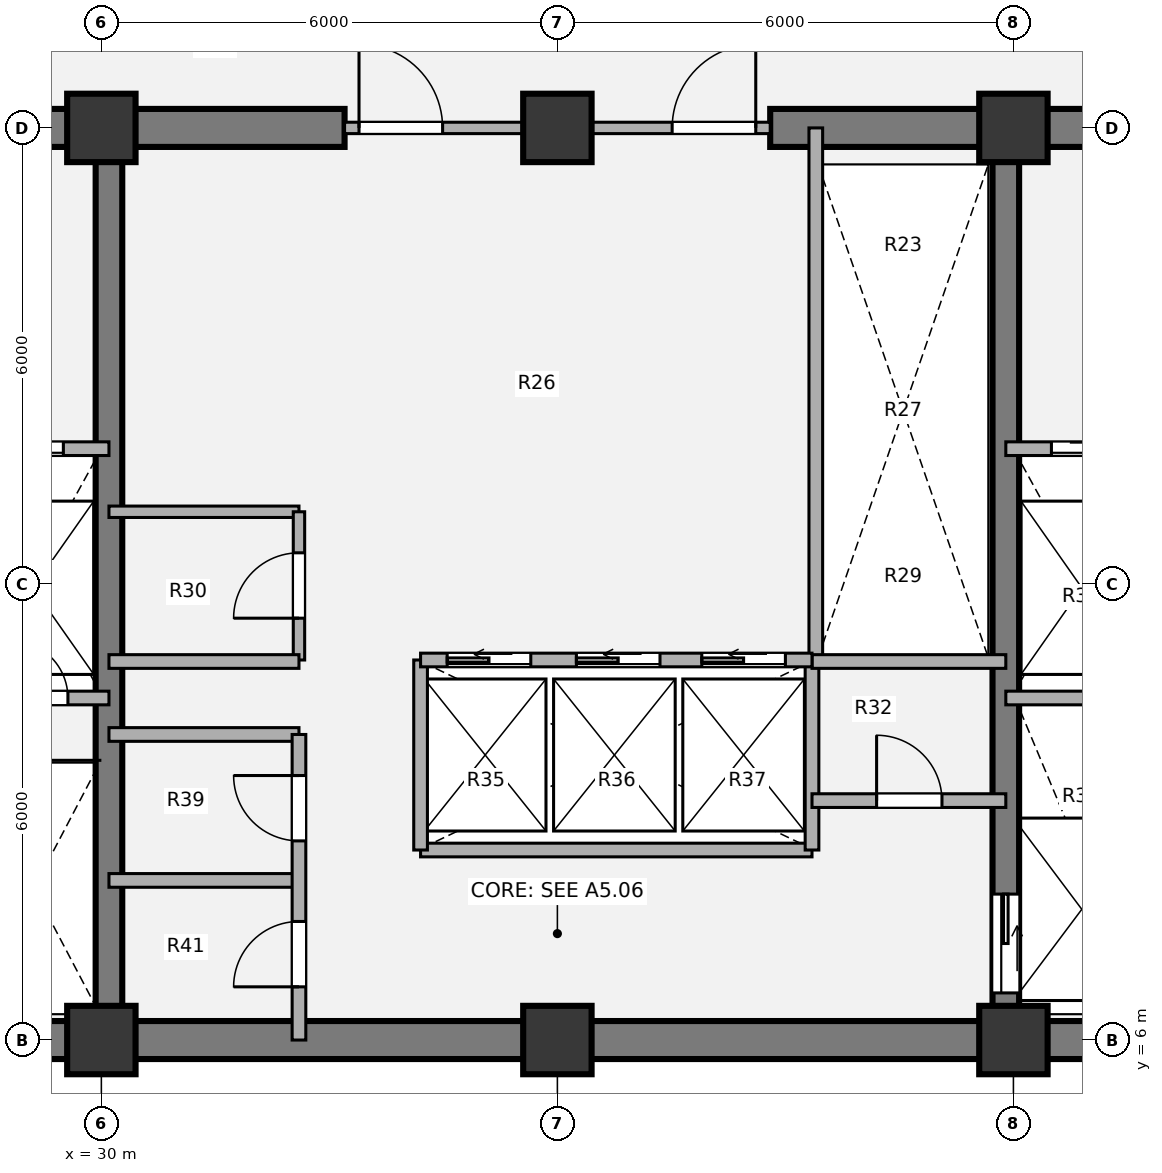
"""IFC4 building model, lengths in metres.
Left out: names, types, materials, properties, quantities, classifications, styles, units other than length and angle.
Written with IfcOpenShell. Run it as: python <this file> out.ifc"""

import sys

from ifc_helpers import new_model, si_unit, direction, frame, frame_2d, origin, origin_2d, place, context, subcontext, project, spatial, rectangle, extrude, source, transform, mapped, element, fill, save


model = new_model("IFC4")
c1 = context("Model", 3, precision=1e-05, world=origin(), true_north=direction((0.0, 1.0)))
c2 = subcontext(c1, "Body", "Model", "MODEL_VIEW")
j1 = project(units=[si_unit("LENGTHUNIT", "METRE"), si_unit("PLANEANGLEUNIT", "RADIAN")], contexts=[c1])
p1 = place(None, origin())
s1 = spatial("IfcSite", under=j1, at=p1, CompositionType="ELEMENT")
p2 = place(p1, origin())
s2 = spatial("IfcBuilding", under=s1, at=p2, CompositionType="ELEMENT")
p3 = place(p2, frame((0.0, 0.0, 97.38)))
s3 = spatial("IfcBuildingStorey", under=s2, at=p3, CompositionType="ELEMENT", Elevation=97.38)
m1 = source(origin(), c2, "Body", "SweptSolid", [
    extrude(rectangle(XDim=0.9, YDim=0.9, at=origin_2d()), origin(), (0.0, 0.0, 1.0), 3.78),
])
for number, where, z_axis, x_axis in (
    (1, (30.0, 6.0, 0.0), (0.0, 0.0, 1.0), (1.0, 0.0, 0.0)),
    (2, (36.0, 6.0, 0.0), (0.0, 0.0, 1.0), (1.0, 0.0, 0.0)),
    (3, (42.0, 6.0, 0.0), (0.0, 0.0, 1.0), (1.0, 0.0, 0.0)),
    (4, (30.0, 18.0, 0.0), (0.0, 0.0, 1.0), (1.0, 0.0, 0.0)),
    (5, (36.0, 18.0, 0.0), (0.0, 0.0, 1.0), (1.0, 0.0, 0.0)),
    (6, (42.0, 18.0, 0.0), (0.0, 0.0, 1.0), (1.0, 0.0, 0.0)),
):
    element("IfcColumn", number, at=place(p3, frame(where, z_axis=z_axis, x_axis=x_axis)), inside=s3, PredefinedType="COLUMN", context=c2, shape_type="MappedRepresentation", body=[
        mapped(m1, transform((0.0, 0.0, 0.0), x_axis=(1.0, 0.0, 0.0), y_axis=(0.0, 1.0, 0.0), z_axis=(0.0, 0.0, 1.0), scale=1.0)),
    ])
p4 = place(p3, frame((48.25, 6.0, 0.0), z_axis=(0.0, 0.0, 1.0), x_axis=(-1.0, 0.0, 0.0)))
e7 = element("IfcWall", 7, at=p4, inside=s3, PredefinedType="SHEAR", context=c2, shape_type="SweptSolid", body=[
    extrude(rectangle(XDim=24.5, YDim=0.5, at=frame_2d((12.25, 0.0))), origin(), (0.0, 0.0, 1.0), 3.78),
])
p5 = place(p3, frame((23.75, 18.0, 0.0), z_axis=(0.0, 0.0, 1.0), x_axis=(1.0, 0.0, 0.0)))
e8 = element("IfcWall", 8, at=p5, inside=s3, PredefinedType="SHEAR", context=c2, shape_type="SweptSolid", body=[
    extrude(rectangle(XDim=9.45, YDim=0.5, at=frame_2d((4.725, 0.0))), origin(), (0.0, 0.0, 1.0), 3.78),
])
p6 = place(p5, frame((2.95, 0.0, 0.0)))
e9 = element("IfcOpeningElement", 9, at=p6, cuts=e8, PredefinedType="OPENING", context=c2, shape_type="SweptSolid", body=[
    extrude(rectangle(XDim=1.1, YDim=2.1, at=origin_2d()), frame((0.55, 0.26, 1.05), z_axis=(0.0, -1.0, 0.0), x_axis=(1.0, 0.0, 0.0)), (0.0, 0.0, 1.0), 0.52),
])
p7 = place(p3, frame((38.8, 18.0, 0.0), z_axis=(0.0, 0.0, 1.0), x_axis=(1.0, 0.0, 0.0)))
e10 = element("IfcWall", 10, at=p7, inside=s3, PredefinedType="SHEAR", context=c2, shape_type="SweptSolid", body=[
    extrude(rectangle(XDim=9.45, YDim=0.5, at=frame_2d((4.725, 0.0))), origin(), (0.0, 0.0, 1.0), 3.78),
])
p8 = place(p7, frame((5.45, 0.0, 0.0)))
e11 = element("IfcOpeningElement", 11, at=p8, cuts=e10, PredefinedType="OPENING", context=c2, shape_type="SweptSolid", body=[
    extrude(rectangle(XDim=1.1, YDim=2.1, at=origin_2d()), frame((0.55, 0.26, 1.05), z_axis=(0.0, -1.0, 0.0), x_axis=(1.0, 0.0, 0.0)), (0.0, 0.0, 1.0), 0.52),
])
p9 = place(p3, frame((30.1, 6.0, 0.0), z_axis=(0.0, 0.0, 1.0), x_axis=(0.0, 1.0, 0.0)))
e12 = element("IfcWall", 12, at=p9, inside=s3, PredefinedType="SHEAR", context=c2, shape_type="SweptSolid", body=[
    extrude(rectangle(XDim=12.0, YDim=0.35, at=frame_2d((6.0, 0.0))), origin(), (0.0, 0.0, 1.0), 3.78),
])
p10 = place(p3, frame((41.9, 18.0, 0.0), z_axis=(0.0, 0.0, 1.0), x_axis=(0.0, -1.0, 0.0)))
e13 = element("IfcWall", 13, at=p10, inside=s3, PredefinedType="SHEAR", context=c2, shape_type="SweptSolid", body=[
    extrude(rectangle(XDim=12.0, YDim=0.35, at=frame_2d((6.0, 0.0))), origin(), (0.0, 0.0, 1.0), 3.78),
])
p11 = place(p10, frame((10.08, 0.0, 0.0)))
e14 = element("IfcOpeningElement", 14, at=p11, cuts=e13, PredefinedType="OPENING", context=c2, shape_type="SweptSolid", body=[
    extrude(rectangle(XDim=1.3, YDim=2.1, at=origin_2d()), frame((0.65, 0.185, 1.05), z_axis=(0.0, -1.0, 0.0), x_axis=(1.0, 0.0, 0.0)), (0.0, 0.0, 1.0), 0.37),
])
p12 = place(p3, frame((30.1, 12.95, 0.0), z_axis=(0.0, 0.0, 1.0), x_axis=(1.0, 0.0, 0.0)))
e15 = element("IfcWall", 15, at=p12, inside=s3, PredefinedType="PARTITIONING", context=c2, shape_type="SweptSolid", body=[
    extrude(rectangle(XDim=2.5, YDim=0.15, at=frame_2d((1.25, 0.0))), origin(), (0.0, 0.0, 1.0), 3.5),
])
p13 = place(p3, frame((32.6, 11.0, 0.0), z_axis=(0.0, 0.0, 1.0), x_axis=(0.0, 1.0, 0.0)))
e16 = element("IfcWall", 16, at=p13, inside=s3, PredefinedType="PARTITIONING", context=c2, shape_type="SweptSolid", body=[
    extrude(rectangle(XDim=1.95, YDim=0.15, at=frame_2d((0.975, 0.0))), origin(), (0.0, 0.0, 1.0), 3.5),
])
p14 = place(p13, frame((0.55, 0.0, 0.0)))
e17 = element("IfcOpeningElement", 17, at=p14, cuts=e16, PredefinedType="OPENING", context=c2, shape_type="SweptSolid", body=[
    extrude(rectangle(XDim=0.86, YDim=2.1, at=origin_2d()), frame((0.43, 0.085, 1.05), z_axis=(0.0, -1.0, 0.0), x_axis=(1.0, 0.0, 0.0)), (0.0, 0.0, 1.0), 0.17),
])
p15 = place(p3, frame((34.2, 8.5, 0.0), z_axis=(0.0, 0.0, 1.0), x_axis=(1.0, 0.0, 0.0)))
e18 = element("IfcWall", 18, at=p15, inside=s3, PredefinedType="PARTITIONING", context=c2, shape_type="SweptSolid", body=[
    extrude(rectangle(XDim=5.15, YDim=0.18, at=frame_2d((2.575, 0.0))), origin(), (0.0, 0.0, 1.0), 3.5),
])
for number, where, z_axis, x_axis in (
    (19, (34.2, 8.5, 0.0), (0.0, 0.0, 1.0), (0.0, 1.0, 0.0)),
    (20, (39.35, 8.5, 0.0), (0.0, 0.0, 1.0), (0.0, 1.0, 0.0)),
):
    element("IfcWall", number, at=place(p3, frame(where, z_axis=z_axis, x_axis=x_axis)), inside=s3, PredefinedType="PARTITIONING", context=c2, shape_type="SweptSolid", body=[
        extrude(rectangle(XDim=2.5, YDim=0.18, at=frame_2d((1.25, 0.0))), origin(), (0.0, 0.0, 1.0), 3.5),
    ])
p16 = place(p3, frame((39.4, 11.0, 0.0), z_axis=(0.0, 0.0, 1.0), x_axis=(0.0, 1.0, 0.0)))
e21 = element("IfcWall", 21, at=p16, inside=s3, PredefinedType="PARTITIONING", context=c2, shape_type="SweptSolid", body=[
    extrude(rectangle(XDim=7.0, YDim=0.18, at=frame_2d((3.5, 0.0))), origin(), (0.0, 0.0, 1.0), 3.5),
])
p17 = place(p3, frame((30.1, 10.98, 0.0), z_axis=(0.0, 0.0, 1.0), x_axis=(1.0, 0.0, 0.0)))
e22 = element("IfcWall", 22, at=p17, inside=s3, PredefinedType="PARTITIONING", context=c2, shape_type="SweptSolid", body=[
    extrude(rectangle(XDim=2.5, YDim=0.18, at=frame_2d((1.25, 0.0))), origin(), (0.0, 0.0, 1.0), 3.5),
])
p18 = place(p3, frame((39.35, 10.98, 0.0), z_axis=(0.0, 0.0, 1.0), x_axis=(1.0, 0.0, 0.0)))
e23 = element("IfcWall", 23, at=p18, inside=s3, PredefinedType="PARTITIONING", context=c2, shape_type="SweptSolid", body=[
    extrude(rectangle(XDim=2.55, YDim=0.18, at=frame_2d((1.275, 0.0))), origin(), (0.0, 0.0, 1.0), 3.5),
])
for number, where, z_axis, x_axis in (
    (24, (30.1, 8.1, 0.0), (0.0, 0.0, 1.0), (1.0, 0.0, 0.0)),
    (25, (30.1, 10.02, 0.0), (0.0, 0.0, 1.0), (1.0, 0.0, 0.0)),
):
    element("IfcWall", number, at=place(p3, frame(where, z_axis=z_axis, x_axis=x_axis)), inside=s3, PredefinedType="PARTITIONING", context=c2, shape_type="SweptSolid", body=[
        extrude(rectangle(XDim=2.5, YDim=0.18, at=frame_2d((1.25, 0.0))), origin(), (0.0, 0.0, 1.0), 3.5),
    ])
p19 = place(p3, frame((32.6, 6.0, 0.0), z_axis=(0.0, 0.0, 1.0), x_axis=(0.0, 1.0, 0.0)))
e26 = element("IfcWall", 26, at=p19, inside=s3, PredefinedType="PARTITIONING", context=c2, shape_type="SweptSolid", body=[
    extrude(rectangle(XDim=4.02, YDim=0.18, at=frame_2d((2.01, 0.0))), origin(), (0.0, 0.0, 1.0), 3.5),
])
p20 = place(p19, frame((0.7, 0.0, 0.0)))
e27 = element("IfcOpeningElement", 27, at=p20, cuts=e26, PredefinedType="OPENING", context=c2, shape_type="SweptSolid", body=[
    extrude(rectangle(XDim=0.86, YDim=2.1, at=origin_2d()), frame((0.43, 0.1, 1.05), z_axis=(0.0, -1.0, 0.0), x_axis=(1.0, 0.0, 0.0)), (0.0, 0.0, 1.0), 0.2),
])
p21 = place(p19, frame((2.62, 0.0, 0.0)))
e28 = element("IfcOpeningElement", 28, at=p21, cuts=e26, PredefinedType="OPENING", context=c2, shape_type="SweptSolid", body=[
    extrude(rectangle(XDim=0.86, YDim=2.1, at=origin_2d()), frame((0.43, 0.1, 1.05), z_axis=(0.0, -1.0, 0.0), x_axis=(1.0, 0.0, 0.0)), (0.0, 0.0, 1.0), 0.2),
])
p22 = place(p3, frame((39.35, 9.15, 0.0), z_axis=(0.0, 0.0, 1.0), x_axis=(1.0, 0.0, 0.0)))
e29 = element("IfcWall", 29, at=p22, inside=s3, PredefinedType="PARTITIONING", context=c2, shape_type="SweptSolid", body=[
    extrude(rectangle(XDim=2.55, YDim=0.18, at=frame_2d((1.275, 0.0))), origin(), (0.0, 0.0, 1.0), 3.5),
])
p23 = place(p22, frame((0.85, 0.0, 0.0)))
e30 = element("IfcOpeningElement", 30, at=p23, cuts=e29, PredefinedType="OPENING", context=c2, shape_type="SweptSolid", body=[
    extrude(rectangle(XDim=0.86, YDim=2.1, at=origin_2d()), frame((0.43, 0.1, 1.05), z_axis=(0.0, -1.0, 0.0), x_axis=(1.0, 0.0, 0.0)), (0.0, 0.0, 1.0), 0.2),
])
p24 = place(p3, frame((33.2, 18.0, 0.0), z_axis=(0.0, 0.0, 1.0), x_axis=(1.0, 0.0, 0.0)))
e31 = element("IfcWall", 31, at=p24, inside=s3, PredefinedType="PARTITIONING", context=c2, shape_type="SweptSolid", body=[
    extrude(rectangle(XDim=5.6, YDim=0.15, at=frame_2d((2.8, 0.0))), origin(), (0.0, 0.0, 1.0), 2.315),
])
p25 = place(p24, frame((0.19, 0.0, 0.0)))
e32 = element("IfcOpeningElement", 32, at=p25, cuts=e31, PredefinedType="OPENING", context=c2, shape_type="SweptSolid", body=[
    extrude(rectangle(XDim=1.1, YDim=2.1, at=origin_2d()), frame((0.55, 0.085, 1.05), z_axis=(0.0, -1.0, 0.0), x_axis=(1.0, 0.0, 0.0)), (0.0, 0.0, 1.0), 0.17),
])
p26 = place(p24, frame((4.31, 0.0, 0.0)))
e33 = element("IfcOpeningElement", 33, at=p26, cuts=e31, PredefinedType="OPENING", context=c2, shape_type="SweptSolid", body=[
    extrude(rectangle(XDim=1.1, YDim=2.1, at=origin_2d()), frame((0.55, 0.085, 1.05), z_axis=(0.0, -1.0, 0.0), x_axis=(1.0, 0.0, 0.0)), (0.0, 0.0, 1.0), 0.17),
])
p27 = place(p3, frame((24.0, 13.78, 0.0), z_axis=(0.0, 0.0, 1.0), x_axis=(1.0, 0.0, 0.0)))
e34 = element("IfcWall", 34, at=p27, inside=s3, PredefinedType="PARTITIONING", context=c2, shape_type="SweptSolid", body=[
    extrude(rectangle(XDim=6.1, YDim=0.18, at=frame_2d((3.05, 0.0))), origin(), (0.0, 0.0, 1.0), 3.5),
])
p28 = place(p27, frame((1.15, 0.0, 0.0)))
e35 = element("IfcOpeningElement", 35, at=p28, cuts=e34, PredefinedType="OPENING", context=c2, shape_type="SweptSolid", body=[
    extrude(rectangle(XDim=1.1, YDim=2.1, at=origin_2d()), frame((0.55, 0.1, 1.05), z_axis=(0.0, -1.0, 0.0), x_axis=(1.0, 0.0, 0.0)), (0.0, 0.0, 1.0), 0.2),
])
p29 = place(p27, frame((4.4, 0.0, 0.0)))
e36 = element("IfcOpeningElement", 36, at=p29, cuts=e34, PredefinedType="OPENING", context=c2, shape_type="SweptSolid", body=[
    extrude(rectangle(XDim=1.1, YDim=2.1, at=origin_2d()), frame((0.55, 0.1, 1.05), z_axis=(0.0, -1.0, 0.0), x_axis=(1.0, 0.0, 0.0)), (0.0, 0.0, 1.0), 0.2),
])
p30 = place(p3, frame((28.15, 10.5, 0.0), z_axis=(0.0, 0.0, 1.0), x_axis=(1.0, 0.0, 0.0)))
e37 = element("IfcWall", 37, at=p30, inside=s3, PredefinedType="PARTITIONING", context=c2, shape_type="SweptSolid", body=[
    extrude(rectangle(XDim=1.95, YDim=0.18, at=frame_2d((0.975, 0.0))), origin(), (0.0, 0.0, 1.0), 3.5),
])
p31 = place(p30, frame((0.65, 0.0, 0.0)))
e38 = element("IfcOpeningElement", 38, at=p31, cuts=e37, PredefinedType="OPENING", context=c2, shape_type="SweptSolid", body=[
    extrude(rectangle(XDim=0.76, YDim=2.05, at=origin_2d()), frame((0.38, 0.1, 1.025), z_axis=(0.0, -1.0, 0.0), x_axis=(1.0, 0.0, 0.0)), (0.0, 0.0, 1.0), 0.2),
])
p32 = place(p3, frame((41.9, 13.78, 0.0), z_axis=(0.0, 0.0, 1.0), x_axis=(1.0, 0.0, 0.0)))
e39 = element("IfcWall", 39, at=p32, inside=s3, PredefinedType="PARTITIONING", context=c2, shape_type="SweptSolid", body=[
    extrude(rectangle(XDim=6.1, YDim=0.18, at=frame_2d((3.05, 0.0))), origin(), (0.0, 0.0, 1.0), 3.5),
])
p33 = place(p32, frame((0.6, 0.0, 0.0)))
e40 = element("IfcOpeningElement", 40, at=p33, cuts=e39, PredefinedType="OPENING", context=c2, shape_type="SweptSolid", body=[
    extrude(rectangle(XDim=1.1, YDim=2.1, at=origin_2d()), frame((0.55, 0.1, 1.05), z_axis=(0.0, -1.0, 0.0), x_axis=(1.0, 0.0, 0.0)), (0.0, 0.0, 1.0), 0.2),
])
p34 = place(p32, frame((3.8, 0.0, 0.0)))
e41 = element("IfcOpeningElement", 41, at=p34, cuts=e39, PredefinedType="OPENING", context=c2, shape_type="SweptSolid", body=[
    extrude(rectangle(XDim=1.1, YDim=2.1, at=origin_2d()), frame((0.55, 0.1, 1.05), z_axis=(0.0, -1.0, 0.0), x_axis=(1.0, 0.0, 0.0)), (0.0, 0.0, 1.0), 0.2),
])
p35 = place(p3, frame((41.9, 10.5, 0.0), z_axis=(0.0, 0.0, 1.0), x_axis=(1.0, 0.0, 0.0)))
e42 = element("IfcWall", 42, at=p35, inside=s3, PredefinedType="PARTITIONING", context=c2, shape_type="SweptSolid", body=[
    extrude(rectangle(XDim=1.95, YDim=0.18, at=frame_2d((0.975, 0.0))), origin(), (0.0, 0.0, 1.0), 3.5),
])
p36 = place(p3, frame((34.2, 11.0, 0.0), z_axis=(0.0, 0.0, 1.0), x_axis=(1.0, 0.0, 0.0)))
e43 = element("IfcWall", 43, at=p36, inside=s3, PredefinedType="PARTITIONING", context=c2, shape_type="SweptSolid", body=[
    extrude(rectangle(XDim=5.15, YDim=0.18, at=frame_2d((2.575, 0.0))), origin(), (0.0, 0.0, 1.0), 3.5),
])
p37 = place(p36, frame((0.35, 0.0, 0.0)))
e44 = element("IfcOpeningElement", 44, at=p37, cuts=e43, PredefinedType="OPENING", context=c2, shape_type="SweptSolid", body=[
    extrude(rectangle(XDim=1.1, YDim=2.1, at=origin_2d()), frame((0.55, 0.1, 1.05), z_axis=(0.0, -1.0, 0.0), x_axis=(1.0, 0.0, 0.0)), (0.0, 0.0, 1.0), 0.2),
])
p38 = place(p36, frame((2.05, 0.0, 0.0)))
e45 = element("IfcOpeningElement", 45, at=p38, cuts=e43, PredefinedType="OPENING", context=c2, shape_type="SweptSolid", body=[
    extrude(rectangle(XDim=1.1, YDim=2.1, at=origin_2d()), frame((0.55, 0.1, 1.05), z_axis=(0.0, -1.0, 0.0), x_axis=(1.0, 0.0, 0.0)), (0.0, 0.0, 1.0), 0.2),
])
p39 = place(p36, frame((3.7, 0.0, 0.0)))
e46 = element("IfcOpeningElement", 46, at=p39, cuts=e43, PredefinedType="OPENING", context=c2, shape_type="SweptSolid", body=[
    extrude(rectangle(XDim=1.1, YDim=2.1, at=origin_2d()), frame((0.55, 0.1, 1.05), z_axis=(0.0, -1.0, 0.0), x_axis=(1.0, 0.0, 0.0)), (0.0, 0.0, 1.0), 0.2),
])
m2 = source(origin(), c2, "Body", "SweptSolid", [
    extrude(rectangle(XDim=0.86, YDim=2.1, at=origin_2d()), frame((0.43, 0.025, 1.05), z_axis=(0.0, -1.0, 0.0), x_axis=(1.0, 0.0, 0.0)), (0.0, 0.0, 1.0), 0.05),
])
p40 = place(p14, origin())
e47 = element("IfcDoor", 47, at=p40, inside=s3, OperationType="SINGLE_SWING_LEFT", PredefinedType="DOOR", context=c2, shape_type="MappedRepresentation", body=[
    mapped(m2, transform((0.0, 0.0, 0.0), x_axis=(1.0, 0.0, 0.0), y_axis=(0.0, 1.0, 0.0), z_axis=(0.0, 0.0, 1.0), scale=1.0)),
])
fill(e17, e47)
p41 = place(p20, origin())
e48 = element("IfcDoor", 48, at=p41, inside=s3, OperationType="SINGLE_SWING_LEFT", PredefinedType="DOOR", context=c2, shape_type="MappedRepresentation", body=[
    mapped(m2, transform((0.0, 0.0, 0.0), x_axis=(1.0, 0.0, 0.0), y_axis=(0.0, 1.0, 0.0), z_axis=(0.0, 0.0, 1.0), scale=1.0)),
])
fill(e27, e48)
p42 = place(p21, origin())
e49 = element("IfcDoor", 49, at=p42, inside=s3, OperationType="SINGLE_SWING_RIGHT", PredefinedType="DOOR", context=c2, shape_type="MappedRepresentation", body=[
    mapped(m2, transform((0.0, 0.0, 0.0), x_axis=(1.0, 0.0, 0.0), y_axis=(0.0, 1.0, 0.0), z_axis=(0.0, 0.0, 1.0), scale=1.0)),
])
fill(e28, e49)
p43 = place(p23, origin())
e50 = element("IfcDoor", 50, at=p43, inside=s3, OperationType="SINGLE_SWING_LEFT", PredefinedType="DOOR", context=c2, shape_type="MappedRepresentation", body=[
    mapped(m2, transform((0.0, 0.0, 0.0), x_axis=(1.0, 0.0, 0.0), y_axis=(0.0, 1.0, 0.0), z_axis=(0.0, 0.0, 1.0), scale=1.0)),
])
fill(e30, e50)
m3 = source(origin(), c2, "Body", "SweptSolid", [
    extrude(rectangle(XDim=1.1, YDim=2.1, at=origin_2d()), frame((0.55, 0.025, 1.05), z_axis=(0.0, -1.0, 0.0), x_axis=(1.0, 0.0, 0.0)), (0.0, 0.0, 1.0), 0.05),
])
p44 = place(p25, origin())
e51 = element("IfcDoor", 51, at=p44, inside=s3, OperationType="SINGLE_SWING_LEFT", PredefinedType="DOOR", context=c2, shape_type="MappedRepresentation", body=[
    mapped(m3, transform((0.0, 0.0, 0.0), x_axis=(1.0, 0.0, 0.0), y_axis=(0.0, 1.0, 0.0), z_axis=(0.0, 0.0, 1.0), scale=1.0)),
])
fill(e32, e51)
p45 = place(p26, origin())
e52 = element("IfcDoor", 52, at=p45, inside=s3, OperationType="SINGLE_SWING_RIGHT", PredefinedType="DOOR", context=c2, shape_type="MappedRepresentation", body=[
    mapped(m3, transform((0.0, 0.0, 0.0), x_axis=(1.0, 0.0, 0.0), y_axis=(0.0, 1.0, 0.0), z_axis=(0.0, 0.0, 1.0), scale=1.0)),
])
fill(e33, e52)
m4 = source(origin(), c2, "Body", "SweptSolid", [
    extrude(rectangle(XDim=1.1, YDim=2.1, at=origin_2d()), frame((0.55, 0.025, 1.05), z_axis=(0.0, -1.0, 0.0), x_axis=(1.0, 0.0, 0.0)), (0.0, 0.0, 1.0), 0.05),
])
p46 = place(p29, origin())
e53 = element("IfcDoor", 53, at=p46, inside=s3, OperationType="SLIDING_TO_LEFT", PredefinedType="DOOR", context=c2, shape_type="MappedRepresentation", body=[
    mapped(m4, transform((0.0, 0.0, 0.0), x_axis=(1.0, 0.0, 0.0), y_axis=(0.0, 1.0, 0.0), z_axis=(0.0, 0.0, 1.0), scale=1.0)),
])
fill(e36, e53)
m5 = source(origin(), c2, "Body", "SweptSolid", [
    extrude(rectangle(XDim=0.76, YDim=2.05, at=origin_2d()), frame((0.38, 0.025, 1.025), z_axis=(0.0, -1.0, 0.0), x_axis=(1.0, 0.0, 0.0)), (0.0, 0.0, 1.0), 0.05),
])
p47 = place(p31, origin())
e54 = element("IfcDoor", 54, at=p47, inside=s3, OperationType="SINGLE_SWING_LEFT", PredefinedType="DOOR", context=c2, shape_type="MappedRepresentation", body=[
    mapped(m5, transform((0.0, 0.0, 0.0), x_axis=(1.0, 0.0, 0.0), y_axis=(0.0, 1.0, 0.0), z_axis=(0.0, 0.0, 1.0), scale=1.0)),
])
fill(e38, e54)
p48 = place(p33, origin())
e55 = element("IfcDoor", 55, at=p48, inside=s3, OperationType="SLIDING_TO_RIGHT", PredefinedType="DOOR", context=c2, shape_type="MappedRepresentation", body=[
    mapped(m4, transform((0.0, 0.0, 0.0), x_axis=(1.0, 0.0, 0.0), y_axis=(0.0, 1.0, 0.0), z_axis=(0.0, 0.0, 1.0), scale=1.0)),
])
fill(e40, e55)
m6 = source(origin(), c2, "Body", "SweptSolid", [
    extrude(rectangle(XDim=1.3, YDim=2.1, at=origin_2d()), frame((0.65, 0.025, 1.05), z_axis=(0.0, -1.0, 0.0), x_axis=(1.0, 0.0, 0.0)), (0.0, 0.0, 1.0), 0.05),
])
p49 = place(p11, origin())
e56 = element("IfcDoor", 56, at=p49, inside=s3, OperationType="SLIDING_TO_LEFT", PredefinedType="DOOR", context=c2, shape_type="MappedRepresentation", body=[
    mapped(m6, transform((0.0, 0.0, 0.0), x_axis=(1.0, 0.0, 0.0), y_axis=(0.0, 1.0, 0.0), z_axis=(0.0, 0.0, 1.0), scale=1.0)),
])
fill(e14, e56)
p50 = place(p37, origin())
e57 = element("IfcDoor", 57, at=p50, inside=s3, OperationType="SLIDING_TO_LEFT", PredefinedType="DOOR", context=c2, shape_type="MappedRepresentation", body=[
    mapped(m4, transform((0.0, 0.0, 0.0), x_axis=(1.0, 0.0, 0.0), y_axis=(0.0, 1.0, 0.0), z_axis=(0.0, 0.0, 1.0), scale=1.0)),
])
fill(e44, e57)
p51 = place(p38, origin())
e58 = element("IfcDoor", 58, at=p51, inside=s3, OperationType="SLIDING_TO_LEFT", PredefinedType="DOOR", context=c2, shape_type="MappedRepresentation", body=[
    mapped(m4, transform((0.0, 0.0, 0.0), x_axis=(1.0, 0.0, 0.0), y_axis=(0.0, 1.0, 0.0), z_axis=(0.0, 0.0, 1.0), scale=1.0)),
])
fill(e45, e58)
p52 = place(p39, origin())
e59 = element("IfcDoor", 59, at=p52, inside=s3, OperationType="SLIDING_TO_LEFT", PredefinedType="DOOR", context=c2, shape_type="MappedRepresentation", body=[
    mapped(m4, transform((0.0, 0.0, 0.0), x_axis=(1.0, 0.0, 0.0), y_axis=(0.0, 1.0, 0.0), z_axis=(0.0, 0.0, 1.0), scale=1.0)),
])
fill(e46, e59)
save(model, sys.argv[1])
